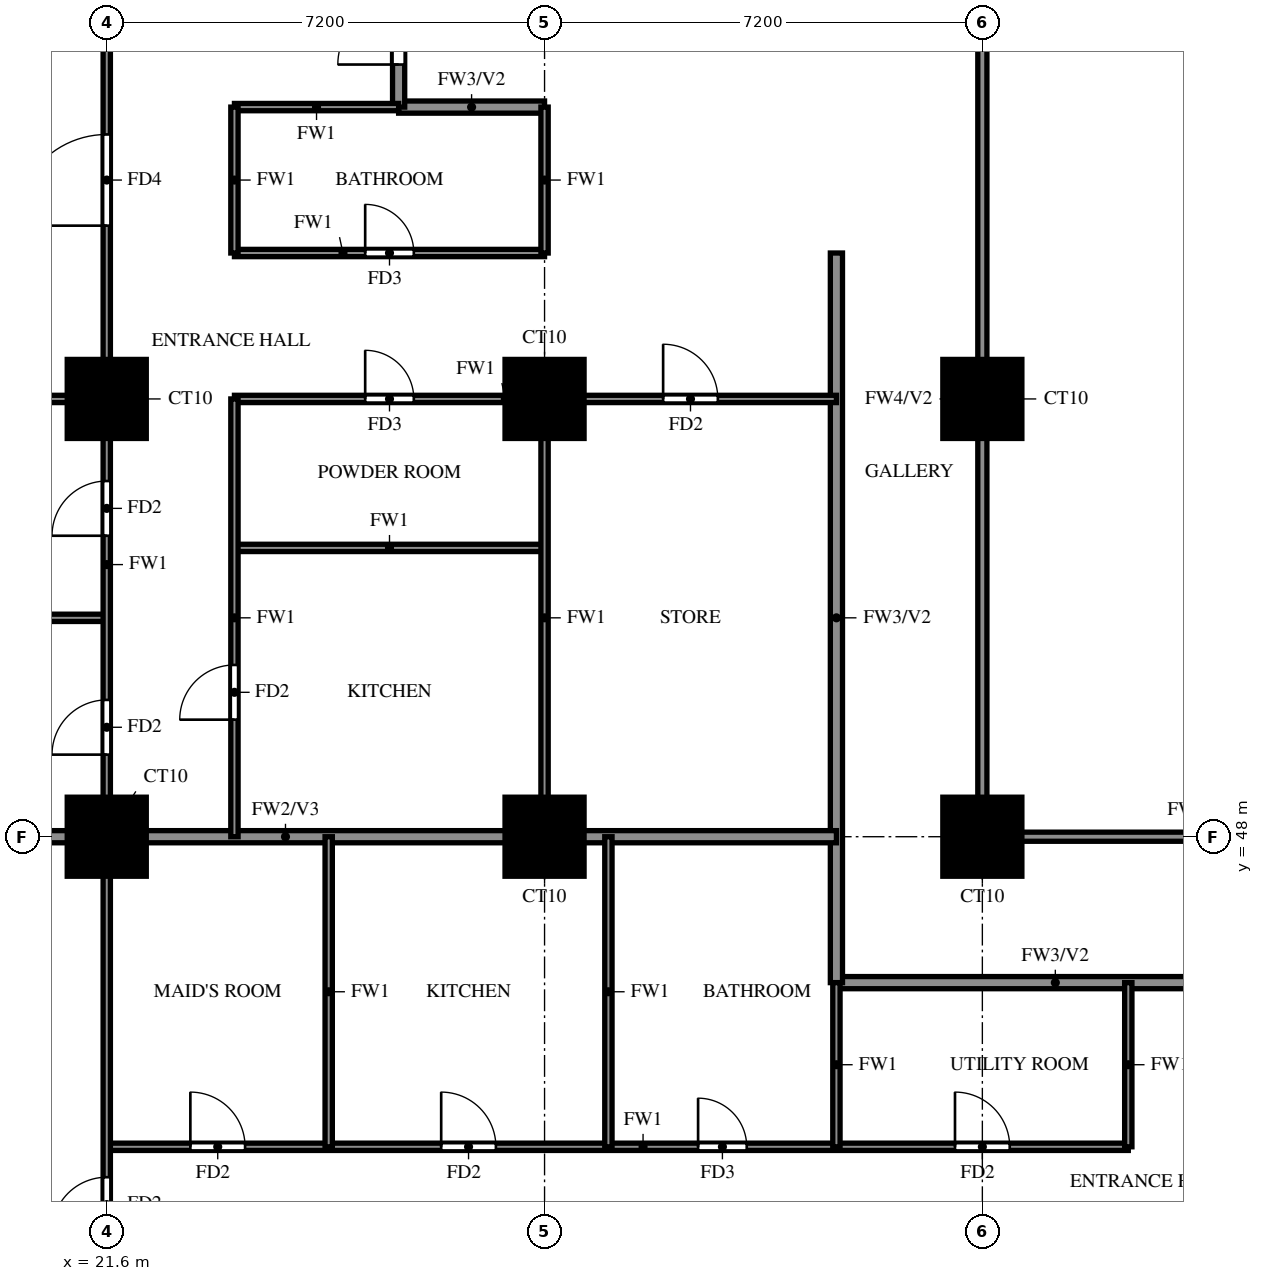
"""IFC4 building model, lengths in metres.
Left out: names, types, materials, properties, quantities, classifications, styles, units other than length and angle.
Written with IfcOpenShell. Run it as: python <this file> out.ifc"""

import sys

from ifc_helpers import new_model, si_unit, direction, frame, frame_2d, origin, origin_2d, place, context, subcontext, project, spatial, rectangle, extrude, source, transform, mapped, element, fill, save


model = new_model("IFC4")
c1 = context("Model", 3, precision=1e-05, world=origin(), true_north=direction((0.0, 1.0)))
c2 = subcontext(c1, "Body", "Model", "MODEL_VIEW")
j1 = project(units=[si_unit("LENGTHUNIT", "METRE"), si_unit("PLANEANGLEUNIT", "RADIAN")], contexts=[c1])
p1 = place(None, origin())
s1 = spatial("IfcSite", under=j1, at=p1, CompositionType="ELEMENT")
p2 = place(p1, origin())
s2 = spatial("IfcBuilding", under=s1, at=p2, CompositionType="ELEMENT")
p3 = place(p2, frame((0.0, 0.0, 69.0)))
s3 = spatial("IfcBuildingStorey", under=s2, at=p3, CompositionType="ELEMENT", Elevation=69.0)
m1 = source(origin(), c2, "Body", "SweptSolid", [
    extrude(rectangle(XDim=1.3, YDim=1.3, at=origin_2d()), origin(), (0.0, 0.0, 1.0), 3.18),
])
for number, where, z_axis, x_axis in (
    (1, (21.6, 48.0, 0.0), (0.0, 0.0, 1.0), (1.0, 0.0, 0.0)),
    (2, (28.8, 48.0, 0.0), (0.0, 0.0, 1.0), (1.0, 0.0, 0.0)),
    (3, (36.0, 48.0, 0.0), (0.0, 0.0, 1.0), (1.0, 0.0, 0.0)),
    (4, (21.6, 55.2, 0.0), (0.0, 0.0, 1.0), (1.0, 0.0, 0.0)),
    (5, (28.8, 55.2, 0.0), (0.0, 0.0, 1.0), (1.0, 0.0, 0.0)),
    (6, (36.0, 55.2, 0.0), (0.0, 0.0, 1.0), (1.0, 0.0, 0.0)),
):
    element("IfcColumn", number, at=place(p3, frame(where, z_axis=z_axis, x_axis=x_axis)), inside=s3, PredefinedType="COLUMN", context=c2, shape_type="MappedRepresentation", body=[
        mapped(m1, transform((0.0, 0.0, 0.0))),
    ])
p4 = place(p3, frame((33.6, 45.6, 0.0), z_axis=(0.0, 0.0, 1.0), x_axis=(1.0, 0.0, 0.0)))
e7 = element("IfcWall", 7, at=p4, inside=s3, PredefinedType="SOLIDWALL", context=c2, shape_type="SweptSolid", body=[
    extrude(rectangle(XDim=7.2, YDim=0.2, at=frame_2d((3.6, 0.0))), origin(), (0.0, 0.0, 1.0), 3.18),
])
p5 = place(p3, frame((26.4, 60.0, 0.0), z_axis=(0.0, 0.0, 1.0), x_axis=(1.0, 0.0, 0.0)))
e8 = element("IfcWall", 8, at=p5, inside=s3, PredefinedType="SOLIDWALL", context=c2, shape_type="SweptSolid", body=[
    extrude(rectangle(XDim=2.4, YDim=0.2, at=frame_2d((1.2, 0.0))), origin(), (0.0, 0.0, 1.0), 3.18),
])
p6 = place(p3, frame((26.4, 60.0, 0.0), z_axis=(0.0, 0.0, 1.0), x_axis=(0.0, 1.0, 0.0)))
e9 = element("IfcWall", 9, at=p6, inside=s3, PredefinedType="SOLIDWALL", context=c2, shape_type="SweptSolid", body=[
    extrude(rectangle(XDim=9.6, YDim=0.2, at=frame_2d((4.8, 0.0))), origin(), (0.0, 0.0, 1.0), 3.18),
])
p7 = place(p6, frame((0.7, 0.0, 0.0)))
e10 = element("IfcOpeningElement", 10, at=p7, cuts=e9, PredefinedType="OPENING", context=c2, shape_type="SweptSolid", body=[
    extrude(rectangle(XDim=1.0, YDim=2.1, at=frame_2d((0.5, 1.05))), frame((0.0, 0.11, 0.0), z_axis=(0.0, -1.0, 0.0), x_axis=(1.0, 0.0, 0.0)), (0.0, 0.0, 1.0), 0.22),
])
p8 = place(p6, frame((3.1, 0.0, 0.0)))
e11 = element("IfcOpeningElement", 11, at=p8, cuts=e9, PredefinedType="OPENING", context=c2, shape_type="SweptSolid", body=[
    extrude(rectangle(XDim=1.0, YDim=2.1, at=frame_2d((0.5, 1.05))), frame((0.0, 0.11, 0.0), z_axis=(0.0, -1.0, 0.0), x_axis=(1.0, 0.0, 0.0)), (0.0, 0.0, 1.0), 0.22),
])
p9 = place(p3, frame((33.6, 45.6, 0.0), z_axis=(0.0, 0.0, 1.0), x_axis=(0.0, 1.0, 0.0)))
e12 = element("IfcWall", 12, at=p9, inside=s3, PredefinedType="SOLIDWALL", context=c2, shape_type="SweptSolid", body=[
    extrude(rectangle(XDim=12.0, YDim=0.2, at=frame_2d((6.0, 0.0))), origin(), (0.0, 0.0, 1.0), 3.18),
])
p10 = place(p3, frame((14.525, 48.0, 0.0), z_axis=(0.0, 0.0, 1.0), x_axis=(1.0, 0.0, 0.0)))
e13 = element("IfcWall", 13, at=p10, inside=s3, PredefinedType="SOLIDWALL", context=c2, shape_type="SweptSolid", body=[
    extrude(rectangle(XDim=19.075, YDim=0.2, at=frame_2d((9.538, 0.0))), origin(), (0.0, 0.0, 1.0), 3.18),
])
p11 = place(p3, frame((21.6, 42.9, 0.0), z_axis=(0.0, 0.0, 1.0), x_axis=(1.0, 0.0, 0.0)))
e14 = element("IfcWall", 14, at=p11, inside=s3, PredefinedType="PARTITIONING", context=c2, shape_type="SweptSolid", body=[
    extrude(rectangle(XDim=16.8, YDim=0.12, at=frame_2d((8.4, 0.0))), origin(), (0.0, 0.0, 1.0), 3.18),
])
p12 = place(p11, frame((1.375, 0.0, 0.0)))
e15 = element("IfcOpeningElement", 15, at=p12, cuts=e14, PredefinedType="OPENING", context=c2, shape_type="SweptSolid", body=[
    extrude(rectangle(XDim=0.9, YDim=2.1, at=frame_2d((0.45, 1.05))), frame((0.0, 0.07, 0.0), z_axis=(0.0, -1.0, 0.0), x_axis=(1.0, 0.0, 0.0)), (0.0, 0.0, 1.0), 0.14),
])
p13 = place(p11, frame((5.5, 0.0, 0.0)))
e16 = element("IfcOpeningElement", 16, at=p13, cuts=e14, PredefinedType="OPENING", context=c2, shape_type="SweptSolid", body=[
    extrude(rectangle(XDim=0.9, YDim=2.1, at=frame_2d((0.45, 1.05))), frame((0.0, 0.07, 0.0), z_axis=(0.0, -1.0, 0.0), x_axis=(1.0, 0.0, 0.0)), (0.0, 0.0, 1.0), 0.14),
])
p14 = place(p11, frame((9.725, 0.0, 0.0)))
e17 = element("IfcOpeningElement", 17, at=p14, cuts=e14, PredefinedType="OPENING", context=c2, shape_type="SweptSolid", body=[
    extrude(rectangle(XDim=0.8, YDim=2.1, at=frame_2d((0.4, 1.05))), frame((0.0, 0.07, 0.0), z_axis=(0.0, -1.0, 0.0), x_axis=(1.0, 0.0, 0.0)), (0.0, 0.0, 1.0), 0.14),
])
p15 = place(p11, frame((13.95, 0.0, 0.0)))
e18 = element("IfcOpeningElement", 18, at=p15, cuts=e14, PredefinedType="OPENING", context=c2, shape_type="SweptSolid", body=[
    extrude(rectangle(XDim=0.9, YDim=2.1, at=frame_2d((0.45, 1.05))), frame((0.0, 0.07, 0.0), z_axis=(0.0, -1.0, 0.0), x_axis=(1.0, 0.0, 0.0)), (0.0, 0.0, 1.0), 0.14),
])
p16 = place(p3, frame((14.525, 51.6, 0.0), z_axis=(0.0, 0.0, 1.0), x_axis=(1.0, 0.0, 0.0)))
e19 = element("IfcWall", 19, at=p16, inside=s3, PredefinedType="PARTITIONING", context=c2, shape_type="SweptSolid", body=[
    extrude(rectangle(XDim=7.075, YDim=0.12, at=frame_2d((3.538, 0.0))), origin(), (0.0, 0.0, 1.0), 2.28),
])
p17 = place(p3, frame((23.7, 52.75, 0.0), z_axis=(0.0, 0.0, 1.0), x_axis=(1.0, 0.0, 0.0)))
e20 = element("IfcWall", 20, at=p17, inside=s3, PredefinedType="PARTITIONING", context=c2, shape_type="SweptSolid", body=[
    extrude(rectangle(XDim=5.1, YDim=0.12, at=frame_2d((2.55, 0.0))), origin(), (0.0, 0.0, 1.0), 3.18),
])
p18 = place(p3, frame((14.525, 55.2, 0.0), z_axis=(0.0, 0.0, 1.0), x_axis=(1.0, 0.0, 0.0)))
e21 = element("IfcWall", 21, at=p18, inside=s3, PredefinedType="PARTITIONING", context=c2, shape_type="SweptSolid", body=[
    extrude(rectangle(XDim=7.075, YDim=0.12, at=frame_2d((3.538, 0.0))), origin(), (0.0, 0.0, 1.0), 3.18),
])
p19 = place(p3, frame((23.7, 55.2, 0.0), z_axis=(0.0, 0.0, 1.0), x_axis=(1.0, 0.0, 0.0)))
e22 = element("IfcWall", 22, at=p19, inside=s3, PredefinedType="PARTITIONING", context=c2, shape_type="SweptSolid", body=[
    extrude(rectangle(XDim=9.9, YDim=0.12, at=frame_2d((4.95, 0.0))), origin(), (0.0, 0.0, 1.0), 3.18),
])
p20 = place(p19, frame((2.15, 0.0, 0.0)))
e23 = element("IfcOpeningElement", 23, at=p20, cuts=e22, PredefinedType="OPENING", context=c2, shape_type="SweptSolid", body=[
    extrude(rectangle(XDim=0.8, YDim=2.1, at=frame_2d((0.4, 1.05))), frame((0.0, 0.07, 0.0), z_axis=(0.0, -1.0, 0.0), x_axis=(1.0, 0.0, 0.0)), (0.0, 0.0, 1.0), 0.14),
])
p21 = place(p19, frame((7.05, 0.0, 0.0)))
e24 = element("IfcOpeningElement", 24, at=p21, cuts=e22, PredefinedType="OPENING", context=c2, shape_type="SweptSolid", body=[
    extrude(rectangle(XDim=0.9, YDim=2.1, at=frame_2d((0.45, 1.05))), frame((0.0, 0.07, 0.0), z_axis=(0.0, -1.0, 0.0), x_axis=(1.0, 0.0, 0.0)), (0.0, 0.0, 1.0), 0.14),
])
p22 = place(p3, frame((23.7, 57.6, 0.0), z_axis=(0.0, 0.0, 1.0), x_axis=(1.0, 0.0, 0.0)))
e25 = element("IfcWall", 25, at=p22, inside=s3, PredefinedType="PARTITIONING", context=c2, shape_type="SweptSolid", body=[
    extrude(rectangle(XDim=5.1, YDim=0.12, at=frame_2d((2.55, 0.0))), origin(), (0.0, 0.0, 1.0), 3.18),
])
p23 = place(p22, frame((2.15, 0.0, 0.0)))
e26 = element("IfcOpeningElement", 26, at=p23, cuts=e25, PredefinedType="OPENING", context=c2, shape_type="SweptSolid", body=[
    extrude(rectangle(XDim=0.8, YDim=2.1, at=frame_2d((0.4, 1.05))), frame((0.0, 0.07, 0.0), z_axis=(0.0, -1.0, 0.0), x_axis=(1.0, 0.0, 0.0)), (0.0, 0.0, 1.0), 0.14),
])
p24 = place(p3, frame((23.7, 60.0, 0.0), z_axis=(0.0, 0.0, 1.0), x_axis=(1.0, 0.0, 0.0)))
e27 = element("IfcWall", 27, at=p24, inside=s3, PredefinedType="PARTITIONING", context=c2, shape_type="SweptSolid", body=[
    extrude(rectangle(XDim=2.7, YDim=0.12, at=frame_2d((1.35, 0.0))), origin(), (0.0, 0.0, 1.0), 3.18),
])
p25 = place(p3, frame((21.6, 33.725, 0.0), z_axis=(0.0, 0.0, 1.0), x_axis=(0.0, 1.0, 0.0)))
e28 = element("IfcWall", 28, at=p25, inside=s3, PredefinedType="PARTITIONING", context=c2, shape_type="SweptSolid", body=[
    extrude(rectangle(XDim=39.475, YDim=0.12, at=frame_2d((19.737, 0.0))), origin(), (0.0, 0.0, 1.0), 3.18),
])
p26 = place(p25, frame((7.775, 0.0, 0.0)))
e29 = element("IfcOpeningElement", 29, at=p26, cuts=e28, PredefinedType="OPENING", context=c2, shape_type="SweptSolid", body=[
    extrude(rectangle(XDim=0.9, YDim=2.1, at=frame_2d((0.45, 1.05))), frame((0.0, 0.07, 0.0), z_axis=(0.0, -1.0, 0.0), x_axis=(1.0, 0.0, 0.0)), (0.0, 0.0, 1.0), 0.14),
])
p27 = place(p25, frame((15.625, 0.0, 0.0)))
e30 = element("IfcOpeningElement", 30, at=p27, cuts=e28, PredefinedType="OPENING", context=c2, shape_type="SweptSolid", body=[
    extrude(rectangle(XDim=0.9, YDim=2.1, at=frame_2d((0.45, 1.05))), frame((0.0, 0.07, 0.0), z_axis=(0.0, -1.0, 0.0), x_axis=(1.0, 0.0, 0.0)), (0.0, 0.0, 1.0), 0.14),
])
p28 = place(p25, frame((19.225, 0.0, 0.0)))
e31 = element("IfcOpeningElement", 31, at=p28, cuts=e28, PredefinedType="OPENING", context=c2, shape_type="SweptSolid", body=[
    extrude(rectangle(XDim=0.9, YDim=2.1, at=frame_2d((0.45, 1.05))), frame((0.0, 0.07, 0.0), z_axis=(0.0, -1.0, 0.0), x_axis=(1.0, 0.0, 0.0)), (0.0, 0.0, 1.0), 0.14),
])
p29 = place(p25, frame((24.325, 0.0, 0.0)))
e32 = element("IfcOpeningElement", 32, at=p29, cuts=e28, PredefinedType="OPENING", context=c2, shape_type="SweptSolid", body=[
    extrude(rectangle(XDim=1.5, YDim=2.1, at=frame_2d((0.75, 1.05))), frame((0.0, 0.07, 0.0), z_axis=(0.0, -1.0, 0.0), x_axis=(1.0, 0.0, 0.0)), (0.0, 0.0, 1.0), 0.14),
])
p30 = place(p25, frame((30.025, 0.0, 0.0)))
e33 = element("IfcOpeningElement", 33, at=p30, cuts=e28, PredefinedType="OPENING", context=c2, shape_type="SweptSolid", body=[
    extrude(rectangle(XDim=0.9, YDim=2.1, at=frame_2d((0.45, 1.05))), frame((0.0, 0.07, 0.0), z_axis=(0.0, -1.0, 0.0), x_axis=(1.0, 0.0, 0.0)), (0.0, 0.0, 1.0), 0.14),
])
p31 = place(p25, frame((33.625, 0.0, 0.0)))
e34 = element("IfcOpeningElement", 34, at=p31, cuts=e28, PredefinedType="OPENING", context=c2, shape_type="SweptSolid", body=[
    extrude(rectangle(XDim=0.9, YDim=2.1, at=frame_2d((0.45, 1.05))), frame((0.0, 0.07, 0.0), z_axis=(0.0, -1.0, 0.0), x_axis=(1.0, 0.0, 0.0)), (0.0, 0.0, 1.0), 0.14),
])
p32 = place(p25, frame((37.225, 0.0, 0.0)))
e35 = element("IfcOpeningElement", 35, at=p32, cuts=e28, PredefinedType="OPENING", context=c2, shape_type="SweptSolid", body=[
    extrude(rectangle(XDim=0.9, YDim=2.1, at=frame_2d((0.45, 1.05))), frame((0.0, 0.07, 0.0), z_axis=(0.0, -1.0, 0.0), x_axis=(1.0, 0.0, 0.0)), (0.0, 0.0, 1.0), 0.14),
])
p33 = place(p3, frame((23.7, 48.0, 0.0), z_axis=(0.0, 0.0, 1.0), x_axis=(0.0, 1.0, 0.0)))
e36 = element("IfcWall", 36, at=p33, inside=s3, PredefinedType="PARTITIONING", context=c2, shape_type="SweptSolid", body=[
    extrude(rectangle(XDim=7.2, YDim=0.12, at=frame_2d((3.6, 0.0))), origin(), (0.0, 0.0, 1.0), 3.18),
])
p34 = place(p33, frame((1.925, 0.0, 0.0)))
e37 = element("IfcOpeningElement", 37, at=p34, cuts=e36, PredefinedType="OPENING", context=c2, shape_type="SweptSolid", body=[
    extrude(rectangle(XDim=0.9, YDim=2.1, at=frame_2d((0.45, 1.05))), frame((0.0, 0.07, 0.0), z_axis=(0.0, -1.0, 0.0), x_axis=(1.0, 0.0, 0.0)), (0.0, 0.0, 1.0), 0.14),
])
p35 = place(p3, frame((23.7, 57.6, 0.0), z_axis=(0.0, 0.0, 1.0), x_axis=(0.0, 1.0, 0.0)))
e38 = element("IfcWall", 38, at=p35, inside=s3, PredefinedType="PARTITIONING", context=c2, shape_type="SweptSolid", body=[
    extrude(rectangle(XDim=2.4, YDim=0.12, at=frame_2d((1.2, 0.0))), origin(), (0.0, 0.0, 1.0), 3.18),
])
p36 = place(p3, frame((25.25, 42.9, 0.0), z_axis=(0.0, 0.0, 1.0), x_axis=(0.0, 1.0, 0.0)))
e39 = element("IfcWall", 39, at=p36, inside=s3, PredefinedType="PARTITIONING", context=c2, shape_type="SweptSolid", body=[
    extrude(rectangle(XDim=5.1, YDim=0.12, at=frame_2d((2.55, 0.0))), origin(), (0.0, 0.0, 1.0), 3.18),
])
p37 = place(p3, frame((28.8, 48.0, 0.0), z_axis=(0.0, 0.0, 1.0), x_axis=(0.0, 1.0, 0.0)))
e40 = element("IfcWall", 40, at=p37, inside=s3, PredefinedType="PARTITIONING", context=c2, shape_type="SweptSolid", body=[
    extrude(rectangle(XDim=7.2, YDim=0.12, at=frame_2d((3.6, 0.0))), origin(), (0.0, 0.0, 1.0), 3.18),
])
p38 = place(p3, frame((28.8, 57.6, 0.0), z_axis=(0.0, 0.0, 1.0), x_axis=(0.0, 1.0, 0.0)))
e41 = element("IfcWall", 41, at=p38, inside=s3, PredefinedType="PARTITIONING", context=c2, shape_type="SweptSolid", body=[
    extrude(rectangle(XDim=2.4, YDim=0.12, at=frame_2d((1.2, 0.0))), origin(), (0.0, 0.0, 1.0), 3.18),
])
p39 = place(p3, frame((29.85, 42.9, 0.0), z_axis=(0.0, 0.0, 1.0), x_axis=(0.0, 1.0, 0.0)))
e42 = element("IfcWall", 42, at=p39, inside=s3, PredefinedType="PARTITIONING", context=c2, shape_type="SweptSolid", body=[
    extrude(rectangle(XDim=5.1, YDim=0.12, at=frame_2d((2.55, 0.0))), origin(), (0.0, 0.0, 1.0), 3.18),
])
for number, where, z_axis, x_axis in (
    (43, (33.6, 42.9, 0.0), (0.0, 0.0, 1.0), (0.0, 1.0, 0.0)),
    (44, (38.4, 42.9, 0.0), (0.0, 0.0, 1.0), (0.0, 1.0, 0.0)),
):
    element("IfcWall", number, at=place(p3, frame(where, z_axis=z_axis, x_axis=x_axis)), inside=s3, PredefinedType="PARTITIONING", context=c2, shape_type="SweptSolid", body=[
        extrude(rectangle(XDim=2.7, YDim=0.12, at=frame_2d((1.35, 0.0))), origin(), (0.0, 0.0, 1.0), 3.18),
    ])
p40 = place(p3, frame((36.0, 48.0, 0.0), z_axis=(0.0, 0.0, 1.0), x_axis=(1.0, 0.0, 0.0)))
e45 = element("IfcWall", 45, at=p40, inside=s3, PredefinedType="SOLIDWALL", context=c2, shape_type="SweptSolid", body=[
    extrude(rectangle(XDim=7.2, YDim=0.15, at=frame_2d((3.6, 0.0))), origin(), (0.0, 0.0, 1.0), 2.28),
])
p41 = place(p3, frame((36.0, 48.0, 0.0), z_axis=(0.0, 0.0, 1.0), x_axis=(0.0, 1.0, 0.0)))
e46 = element("IfcWall", 46, at=p41, inside=s3, PredefinedType="SOLIDWALL", context=c2, shape_type="SweptSolid", body=[
    extrude(rectangle(XDim=14.4, YDim=0.15, at=frame_2d((7.2, 0.0))), origin(), (0.0, 0.0, 1.0), 2.28),
])
p42 = place(p26, origin())
e47 = element("IfcDoor", 47, at=p42, inside=s3, OperationType="SINGLE_SWING_LEFT", PredefinedType="DOOR", context=c2, shape_type="SweptSolid", body=[
    extrude(rectangle(XDim=0.9, YDim=2.1, at=frame_2d((0.45, 1.05))), frame((0.0, 0.025, 0.0), z_axis=(0.0, -1.0, 0.0), x_axis=(1.0, 0.0, 0.0)), (0.0, 0.0, 1.0), 0.05),
])
fill(e29, e47)
p43 = place(p12, origin())
e48 = element("IfcDoor", 48, at=p43, inside=s3, OperationType="SINGLE_SWING_RIGHT", PredefinedType="DOOR", context=c2, shape_type="SweptSolid", body=[
    extrude(rectangle(XDim=0.9, YDim=2.1, at=frame_2d((0.45, 1.05))), frame((0.0, 0.025, 0.0), z_axis=(0.0, -1.0, 0.0), x_axis=(1.0, 0.0, 0.0)), (0.0, 0.0, 1.0), 0.05),
])
fill(e15, e48)
p44 = place(p13, origin())
e49 = element("IfcDoor", 49, at=p44, inside=s3, OperationType="SINGLE_SWING_LEFT", PredefinedType="DOOR", context=c2, shape_type="SweptSolid", body=[
    extrude(rectangle(XDim=0.9, YDim=2.1, at=frame_2d((0.45, 1.05))), frame((0.0, 0.025, 0.0), z_axis=(0.0, -1.0, 0.0), x_axis=(1.0, 0.0, 0.0)), (0.0, 0.0, 1.0), 0.05),
])
fill(e16, e49)
p45 = place(p14, origin())
e50 = element("IfcDoor", 50, at=p45, inside=s3, OperationType="SINGLE_SWING_LEFT", PredefinedType="DOOR", context=c2, shape_type="SweptSolid", body=[
    extrude(rectangle(XDim=0.8, YDim=2.1, at=frame_2d((0.4, 1.05))), frame((0.0, 0.025, 0.0), z_axis=(0.0, -1.0, 0.0), x_axis=(1.0, 0.0, 0.0)), (0.0, 0.0, 1.0), 0.05),
])
fill(e17, e50)
p46 = place(p15, origin())
e51 = element("IfcDoor", 51, at=p46, inside=s3, OperationType="SINGLE_SWING_RIGHT", PredefinedType="DOOR", context=c2, shape_type="SweptSolid", body=[
    extrude(rectangle(XDim=0.9, YDim=2.1, at=frame_2d((0.45, 1.05))), frame((0.0, 0.025, 0.0), z_axis=(0.0, -1.0, 0.0), x_axis=(1.0, 0.0, 0.0)), (0.0, 0.0, 1.0), 0.05),
])
fill(e18, e51)
p47 = place(p7, origin())
e52 = element("IfcDoor", 52, at=p47, inside=s3, OperationType="SINGLE_SWING_LEFT", PredefinedType="DOOR", context=c2, shape_type="SweptSolid", body=[
    extrude(rectangle(XDim=1.0, YDim=2.1, at=frame_2d((0.5, 1.05))), frame((0.0, 0.025, 0.0), z_axis=(0.0, -1.0, 0.0), x_axis=(1.0, 0.0, 0.0)), (0.0, 0.0, 1.0), 0.05),
])
fill(e10, e52)
p48 = place(p27, origin())
e53 = element("IfcDoor", 53, at=p48, inside=s3, OperationType="SINGLE_SWING_LEFT", PredefinedType="DOOR", context=c2, shape_type="SweptSolid", body=[
    extrude(rectangle(XDim=0.9, YDim=2.1, at=frame_2d((0.45, 1.05))), frame((0.0, 0.025, 0.0), z_axis=(0.0, -1.0, 0.0), x_axis=(1.0, 0.0, 0.0)), (0.0, 0.0, 1.0), 0.05),
])
fill(e30, e53)
p49 = place(p28, origin())
e54 = element("IfcDoor", 54, at=p49, inside=s3, OperationType="SINGLE_SWING_RIGHT", PredefinedType="DOOR", context=c2, shape_type="SweptSolid", body=[
    extrude(rectangle(XDim=0.9, YDim=2.1, at=frame_2d((0.45, 1.05))), frame((0.0, 0.025, 0.0), z_axis=(0.0, -1.0, 0.0), x_axis=(1.0, 0.0, 0.0)), (0.0, 0.0, 1.0), 0.05),
])
fill(e31, e54)
p50 = place(p29, origin())
e55 = element("IfcDoor", 55, at=p50, inside=s3, OperationType="SINGLE_SWING_LEFT", PredefinedType="DOOR", context=c2, shape_type="SweptSolid", body=[
    extrude(rectangle(XDim=1.5, YDim=2.1, at=frame_2d((0.75, 1.05))), frame((0.0, 0.025, 0.0), z_axis=(0.0, -1.0, 0.0), x_axis=(1.0, 0.0, 0.0)), (0.0, 0.0, 1.0), 0.05),
])
fill(e32, e55)
p51 = place(p34, origin())
e56 = element("IfcDoor", 56, at=p51, inside=s3, OperationType="SINGLE_SWING_LEFT", PredefinedType="DOOR", context=c2, shape_type="SweptSolid", body=[
    extrude(rectangle(XDim=0.9, YDim=2.1, at=frame_2d((0.45, 1.05))), frame((0.0, 0.025, 0.0), z_axis=(0.0, -1.0, 0.0), x_axis=(1.0, 0.0, 0.0)), (0.0, 0.0, 1.0), 0.05),
])
fill(e37, e56)
p52 = place(p20, origin())
e57 = element("IfcDoor", 57, at=p52, inside=s3, OperationType="SINGLE_SWING_RIGHT", PredefinedType="DOOR", context=c2, shape_type="SweptSolid", body=[
    extrude(rectangle(XDim=0.8, YDim=2.1, at=frame_2d((0.4, 1.05))), frame((0.0, 0.025, 0.0), z_axis=(0.0, -1.0, 0.0), x_axis=(1.0, 0.0, 0.0)), (0.0, 0.0, 1.0), 0.05),
])
fill(e23, e57)
p53 = place(p23, origin())
e58 = element("IfcDoor", 58, at=p53, inside=s3, OperationType="SINGLE_SWING_LEFT", PredefinedType="DOOR", context=c2, shape_type="SweptSolid", body=[
    extrude(rectangle(XDim=0.8, YDim=2.1, at=frame_2d((0.4, 1.05))), frame((0.0, 0.025, 0.0), z_axis=(0.0, -1.0, 0.0), x_axis=(1.0, 0.0, 0.0)), (0.0, 0.0, 1.0), 0.05),
])
fill(e26, e58)
p54 = place(p21, origin())
e59 = element("IfcDoor", 59, at=p54, inside=s3, OperationType="SINGLE_SWING_LEFT", PredefinedType="DOOR", context=c2, shape_type="SweptSolid", body=[
    extrude(rectangle(XDim=0.9, YDim=2.1, at=frame_2d((0.45, 1.05))), frame((0.0, 0.025, 0.0), z_axis=(0.0, -1.0, 0.0), x_axis=(1.0, 0.0, 0.0)), (0.0, 0.0, 1.0), 0.05),
])
fill(e24, e59)
save(model, sys.argv[1])
